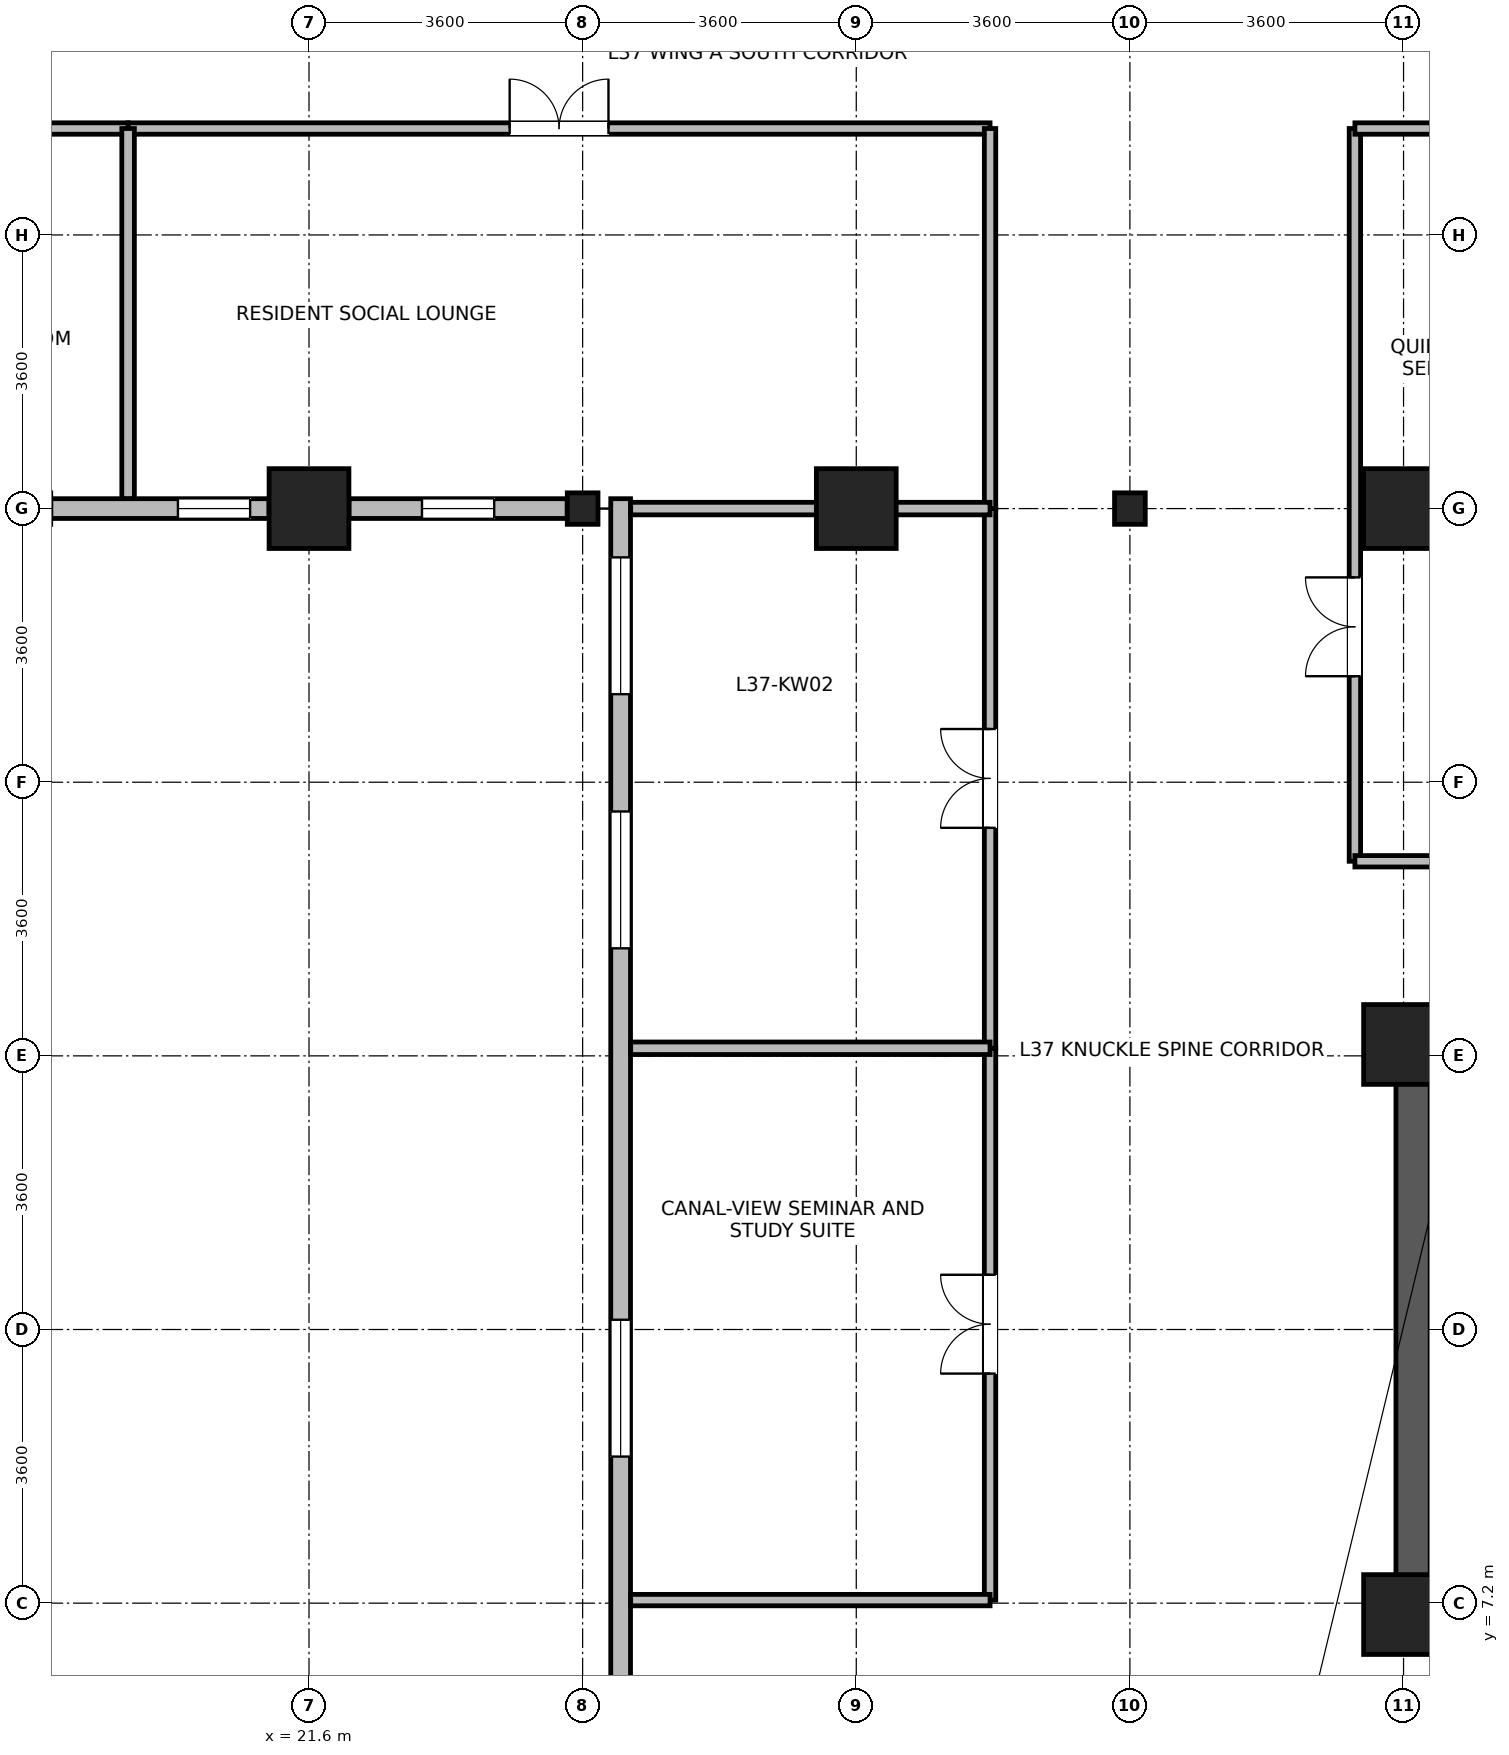
"""IFC4 building model, lengths in metres.
Left out: names, types, materials, properties, quantities, classifications, styles, units other than length and angle.
Written with IfcOpenShell. Run it as: python <this file> out.ifc"""

import sys

from ifc_helpers import new_model, si_unit, direction, frame, frame_2d, origin, origin_2d, place, context, subcontext, project, spatial, rectangle, i_section, extrude, source, transform, mapped, element, fill, save


model = new_model("IFC4")
c1 = context("Model", 3, precision=1e-05, world=origin(), true_north=direction((0.0, 1.0)))
c2 = subcontext(c1, "Body", "Model", "MODEL_VIEW")
j1 = project(units=[si_unit("LENGTHUNIT", "METRE"), si_unit("PLANEANGLEUNIT", "RADIAN")], contexts=[c1])
p1 = place(None, origin())
s1 = spatial("IfcSite", under=j1, at=p1, CompositionType="ELEMENT")
p2 = place(p1, origin())
s2 = spatial("IfcBuilding", under=s1, at=p2, CompositionType="ELEMENT")
p3 = place(p2, frame((0.0, 0.0, 147.6)))
s3 = spatial("IfcBuildingStorey", under=s2, at=p3, CompositionType="ELEMENT", Elevation=147.6)
p4 = place(p3, frame((36.125, 6.85, 0.0), z_axis=(0.0, 0.0, 1.0), x_axis=(0.0, 1.0, 0.0)))
e1 = element("IfcWall", 1, at=p4, inside=s3, PredefinedType="SHEAR", context=c2, shape_type="SweptSolid", body=[
    extrude(rectangle(XDim=7.9, YDim=0.45, at=frame_2d((3.95, 0.0))), origin(), (0.0, 0.0, 1.0), 3.46),
])
m1 = source(origin(), c2, "Body", "SweptSolid", [
    extrude(rectangle(XDim=1.05, YDim=1.05, at=origin_2d()), origin(), (0.0, 0.0, 1.0), 3.7),
])
for number, where, z_axis, x_axis in (
    (2, (21.6, 21.6, 0.0), (0.0, 0.0, 1.0), (1.0, 0.0, 0.0)),
    (3, (28.8, 21.6, 0.0), (0.0, 0.0, 1.0), (1.0, 0.0, 0.0)),
    (4, (36.0, 21.6, 0.0), (0.0, 0.0, 1.0), (1.0, 0.0, 0.0)),
    (5, (36.0, 7.05, 0.0), (0.0, 0.0, 1.0), (1.0, 0.0, 0.0)),
    (6, (36.0, 14.55, 0.0), (0.0, 0.0, 1.0), (1.0, 0.0, 0.0)),
):
    element("IfcColumn", number, at=place(p3, frame(where, z_axis=z_axis, x_axis=x_axis)), inside=s3, PredefinedType="COLUMN", context=c2, shape_type="MappedRepresentation", body=[
        mapped(m1, transform((0.0, 0.0, 0.0), x_axis=(1.0, 0.0, 0.0), y_axis=(0.0, 1.0, 0.0), z_axis=(0.0, 0.0, 1.0), scale=1.0)),
    ])
m2 = source(origin(), c2, "Body", "SweptSolid", [
    extrude(i_section(OverallWidth=0.404, OverallDepth=0.414, WebThickness=0.021, FlangeThickness=0.028, FilletRadius=0.015, at=origin_2d()), origin(), (0.0, 0.0, 1.0), 3.7),
])
for number, where, z_axis, x_axis in (
    (7, (25.2, 21.6, 0.0), (0.0, 0.0, 1.0), (1.0, 0.0, 0.0)),
    (8, (32.4, 21.6, 0.0), (0.0, 0.0, 1.0), (1.0, 0.0, 0.0)),
):
    element("IfcColumn", number, at=place(p3, frame(where, z_axis=z_axis, x_axis=x_axis)), inside=s3, PredefinedType="COLUMN", context=c2, shape_type="MappedRepresentation", body=[
        mapped(m2, transform((0.0, 0.0, 0.0), x_axis=(1.0, 0.0, 0.0), y_axis=(0.0, 1.0, 0.0), z_axis=(0.0, 0.0, 1.0), scale=1.0)),
    ])
p5 = place(p3, frame((21.074, 21.6, 0.0), z_axis=(0.0, 0.0, 1.0), x_axis=(-1.0, 0.0, 0.0)))
e9 = element("IfcWall", 9, at=p5, inside=s3, PredefinedType="STANDARD", context=c2, shape_type="SweptSolid", body=[
    extrude(rectangle(XDim=2.871, YDim=0.26, at=frame_2d((1.436, 0.0))), origin(), (0.0, 0.0, 1.0), 2.99),
])
p6 = place(p5, frame((0.249, 0.0, 0.85)))
e10 = element("IfcOpeningElement", 10, at=p6, cuts=e9, PredefinedType="OPENING", context=c2, shape_type="SweptSolid", body=[
    extrude(rectangle(XDim=0.95, YDim=1.75, at=frame_2d((0.475, 0.875))), frame((0.0, 0.14, 0.0), z_axis=(0.0, -1.0, 0.0), x_axis=(1.0, 0.0, 0.0)), (0.0, 0.0, 1.0), 0.28),
])
p7 = place(p3, frame((24.997, 21.6, 0.0), z_axis=(0.0, 0.0, 1.0), x_axis=(-1.0, 0.0, 0.0)))
e11 = element("IfcWall", 11, at=p7, inside=s3, PredefinedType="STANDARD", context=c2, shape_type="SweptSolid", body=[
    extrude(rectangle(XDim=2.871, YDim=0.26, at=frame_2d((1.436, 0.0))), origin(), (0.0, 0.0, 1.0), 2.99),
])
p8 = place(p7, frame((0.96, 0.0, 0.85)))
e12 = element("IfcOpeningElement", 12, at=p8, cuts=e11, PredefinedType="OPENING", context=c2, shape_type="SweptSolid", body=[
    extrude(rectangle(XDim=0.95, YDim=1.75, at=frame_2d((0.475, 0.875))), frame((0.0, 0.14, 0.0), z_axis=(0.0, -1.0, 0.0), x_axis=(1.0, 0.0, 0.0)), (0.0, 0.0, 1.0), 0.28),
])
p9 = place(p3, frame((25.7, 1.67, 0.0), z_axis=(0.0, 0.0, 1.0), x_axis=(0.0, 1.0, 0.0)))
e13 = element("IfcWall", 13, at=p9, inside=s3, PredefinedType="STANDARD", context=c2, shape_type="SweptSolid", body=[
    extrude(rectangle(XDim=20.06, YDim=0.26, at=frame_2d((10.03, 0.0))), origin(), (0.0, 0.0, 1.0), 3.44),
])
p10 = place(p9, frame((0.772, 0.0, 0.85)))
e14 = element("IfcOpeningElement", 14, at=p10, cuts=e13, PredefinedType="OPENING", context=c2, shape_type="SweptSolid", body=[
    extrude(rectangle(XDim=1.8, YDim=1.85, at=frame_2d((0.9, 0.925))), frame((0.0, 0.14, 0.0), z_axis=(0.0, -1.0, 0.0), x_axis=(1.0, 0.0, 0.0)), (0.0, 0.0, 1.0), 0.28),
])
p11 = place(p9, frame((7.458, 0.0, 0.85)))
e15 = element("IfcOpeningElement", 15, at=p11, cuts=e13, PredefinedType="OPENING", context=c2, shape_type="SweptSolid", body=[
    extrude(rectangle(XDim=1.8, YDim=1.85, at=frame_2d((0.9, 0.925))), frame((0.0, 0.14, 0.0), z_axis=(0.0, -1.0, 0.0), x_axis=(1.0, 0.0, 0.0)), (0.0, 0.0, 1.0), 0.28),
])
p12 = place(p9, frame((14.145, 0.0, 0.85)))
e16 = element("IfcOpeningElement", 16, at=p12, cuts=e13, PredefinedType="OPENING", context=c2, shape_type="SweptSolid", body=[
    extrude(rectangle(XDim=1.8, YDim=1.85, at=frame_2d((0.9, 0.925))), frame((0.0, 0.14, 0.0), z_axis=(0.0, -1.0, 0.0), x_axis=(1.0, 0.0, 0.0)), (0.0, 0.0, 1.0), 0.28),
])
p13 = place(p9, frame((17.488, 0.0, 0.85)))
e17 = element("IfcOpeningElement", 17, at=p13, cuts=e13, PredefinedType="OPENING", context=c2, shape_type="SweptSolid", body=[
    extrude(rectangle(XDim=1.8, YDim=1.85, at=frame_2d((0.9, 0.925))), frame((0.0, 0.14, 0.0), z_axis=(0.0, -1.0, 0.0), x_axis=(1.0, 0.0, 0.0)), (0.0, 0.0, 1.0), 0.28),
])
p14 = place(p3, frame((19.22, 26.6, 0.0), z_axis=(0.0, 0.0, 1.0), x_axis=(1.0, 0.0, 0.0)))
e18 = element("IfcWall", 18, at=p14, inside=s3, PredefinedType="PARTITIONING", context=c2, shape_type="SweptSolid", body=[
    extrude(rectangle(XDim=11.34, YDim=0.15, at=frame_2d((5.67, 0.0))), origin(), (0.0, 0.0, 1.0), 3.44),
])
p15 = place(p14, frame((5.02, 0.0, 0.0)))
e19 = element("IfcOpeningElement", 19, at=p15, cuts=e18, PredefinedType="OPENING", context=c2, shape_type="SweptSolid", body=[
    extrude(rectangle(XDim=1.3, YDim=2.12, at=frame_2d((0.65, 1.06))), frame((0.0, 0.085, 0.0), z_axis=(0.0, -1.0, 0.0), x_axis=(1.0, 0.0, 0.0)), (0.0, 0.0, 1.0), 0.17),
])
p16 = place(p3, frame((35.36, 16.96, 0.0), z_axis=(0.0, 0.0, 1.0), x_axis=(0.0, 1.0, 0.0)))
e20 = element("IfcWall", 20, at=p16, inside=s3, PredefinedType="PARTITIONING", context=c2, shape_type="SweptSolid", body=[
    extrude(rectangle(XDim=9.64, YDim=0.15, at=frame_2d((4.82, 0.0))), origin(), (0.0, 0.0, 1.0), 3.44),
])
p17 = place(p16, frame((2.435, 0.0, 0.0)))
e21 = element("IfcOpeningElement", 21, at=p17, cuts=e20, PredefinedType="OPENING", context=c2, shape_type="SweptSolid", body=[
    extrude(rectangle(XDim=1.3, YDim=2.12, at=frame_2d((0.65, 1.06))), frame((0.0, 0.085, 0.0), z_axis=(0.0, -1.0, 0.0), x_axis=(1.0, 0.0, 0.0)), (0.0, 0.0, 1.0), 0.17),
])
p18 = place(p3, frame((30.56, 7.24, 0.0), z_axis=(0.0, 0.0, 1.0), x_axis=(0.0, 1.0, 0.0)))
e22 = element("IfcWall", 22, at=p18, inside=s3, PredefinedType="PARTITIONING", context=c2, shape_type="SweptSolid", body=[
    extrude(rectangle(XDim=7.26, YDim=0.15, at=frame_2d((3.63, 0.0))), origin(), (0.0, 0.0, 1.0), 3.44),
])
p19 = place(p18, frame((2.98, 0.0, 0.0)))
e23 = element("IfcOpeningElement", 23, at=p19, cuts=e22, PredefinedType="OPENING", context=c2, shape_type="SweptSolid", body=[
    extrude(rectangle(XDim=1.3, YDim=2.12, at=frame_2d((0.65, 1.06))), frame((0.0, 0.085, 0.0), z_axis=(0.0, -1.0, 0.0), x_axis=(1.0, 0.0, 0.0)), (0.0, 0.0, 1.0), 0.17),
])
p20 = place(p3, frame((30.56, 14.5, 0.0), z_axis=(0.0, 0.0, 1.0), x_axis=(0.0, 1.0, 0.0)))
e24 = element("IfcWall", 24, at=p20, inside=s3, PredefinedType="PARTITIONING", context=c2, shape_type="SweptSolid", body=[
    extrude(rectangle(XDim=7.1, YDim=0.15, at=frame_2d((3.55, 0.0))), origin(), (0.0, 0.0, 1.0), 3.44),
])
p21 = place(p20, frame((2.9, 0.0, 0.0)))
e25 = element("IfcOpeningElement", 25, at=p21, cuts=e24, PredefinedType="OPENING", context=c2, shape_type="SweptSolid", body=[
    extrude(rectangle(XDim=1.3, YDim=2.12, at=frame_2d((0.65, 1.06))), frame((0.0, 0.085, 0.0), z_axis=(0.0, -1.0, 0.0), x_axis=(1.0, 0.0, 0.0)), (0.0, 0.0, 1.0), 0.17),
])
p22 = place(p3, frame((13.26, 26.6, 0.0), z_axis=(0.0, 0.0, 1.0), x_axis=(1.0, 0.0, 0.0)))
e26 = element("IfcWall", 26, at=p22, inside=s3, PredefinedType="PARTITIONING", context=c2, shape_type="SweptSolid", body=[
    extrude(rectangle(XDim=5.96, YDim=0.15, at=frame_2d((2.98, 0.0))), origin(), (0.0, 0.0, 1.0), 3.44),
])
p23 = place(p22, frame((2.33, 0.0, 0.0)))
e27 = element("IfcOpeningElement", 27, at=p23, cuts=e26, PredefinedType="OPENING", context=c2, shape_type="SweptSolid", body=[
    extrude(rectangle(XDim=1.3, YDim=2.12, at=frame_2d((0.65, 1.06))), frame((0.0, 0.085, 0.0), z_axis=(0.0, -1.0, 0.0), x_axis=(1.0, 0.0, 0.0)), (0.0, 0.0, 1.0), 0.17),
])
p24 = place(p3, frame((30.56, 21.6, 0.0), z_axis=(0.0, 0.0, 1.0), x_axis=(0.0, 1.0, 0.0)))
e28 = element("IfcWall", 28, at=p24, inside=s3, PredefinedType="PARTITIONING", context=c2, shape_type="SweptSolid", body=[
    extrude(rectangle(XDim=5.0, YDim=0.15, at=frame_2d((2.5, 0.0))), origin(), (0.0, 0.0, 1.0), 3.44),
])
p25 = place(p3, frame((25.832, 7.24, 0.0), z_axis=(0.0, 0.0, 1.0), x_axis=(1.0, 0.0, 0.0)))
e29 = element("IfcWall", 29, at=p25, inside=s3, PredefinedType="PARTITIONING", context=c2, shape_type="SweptSolid", body=[
    extrude(rectangle(XDim=4.728, YDim=0.15, at=frame_2d((2.364, 0.0))), origin(), (0.0, 0.0, 1.0), 3.44),
])
for number, where, z_axis, x_axis in (
    (30, (35.36, 16.96, 0.0), (0.0, 0.0, 1.0), (1.0, 0.0, 0.0)),
    (31, (35.36, 26.6, 0.0), (0.0, 0.0, 1.0), (1.0, 0.0, 0.0)),
):
    element("IfcWall", number, at=place(p3, frame(where, z_axis=z_axis, x_axis=x_axis)), inside=s3, PredefinedType="PARTITIONING", context=c2, shape_type="SweptSolid", body=[
        extrude(rectangle(XDim=3.28, YDim=0.15, at=frame_2d((1.64, 0.0))), origin(), (0.0, 0.0, 1.0), 3.44),
    ])
p26 = place(p3, frame((19.22, 21.732, 0.0), z_axis=(0.0, 0.0, 1.0), x_axis=(0.0, 1.0, 0.0)))
e32 = element("IfcWall", 32, at=p26, inside=s3, PredefinedType="PARTITIONING", context=c2, shape_type="SweptSolid", body=[
    extrude(rectangle(XDim=4.868, YDim=0.165, at=frame_2d((2.434, 0.0))), origin(), (0.0, 0.0, 1.0), 3.44),
])
p27 = place(p3, frame((25.832, 14.5, 0.0), z_axis=(0.0, 0.0, 1.0), x_axis=(1.0, 0.0, 0.0)))
e33 = element("IfcWall", 33, at=p27, inside=s3, PredefinedType="PARTITIONING", context=c2, shape_type="SweptSolid", body=[
    extrude(rectangle(XDim=4.728, YDim=0.165, at=frame_2d((2.364, 0.0))), origin(), (0.0, 0.0, 1.0), 3.44),
])
p28 = place(p3, frame((25.832, 21.6, 0.0), z_axis=(0.0, 0.0, 1.0), x_axis=(1.0, 0.0, 0.0)))
e34 = element("IfcWall", 34, at=p28, inside=s3, PredefinedType="PARTITIONING", context=c2, shape_type="SweptSolid", body=[
    extrude(rectangle(XDim=4.728, YDim=0.165, at=frame_2d((2.364, 0.0))), origin(), (0.0, 0.0, 1.0), 2.99),
])
p29 = place(p6, origin())
e35 = element("IfcWindow", 35, at=p29, inside=s3, PartitioningType="SINGLE_PANEL", PredefinedType="WINDOW", context=c2, shape_type="SweptSolid", body=[
    extrude(rectangle(XDim=0.95, YDim=1.75, at=frame_2d((0.475, 0.875))), frame((0.0, 0.03, 0.0), z_axis=(0.0, -1.0, 0.0), x_axis=(1.0, 0.0, 0.0)), (0.0, 0.0, 1.0), 0.06),
])
fill(e10, e35)
p30 = place(p8, origin())
e36 = element("IfcWindow", 36, at=p30, inside=s3, PartitioningType="SINGLE_PANEL", PredefinedType="WINDOW", context=c2, shape_type="SweptSolid", body=[
    extrude(rectangle(XDim=0.95, YDim=1.75, at=frame_2d((0.475, 0.875))), frame((0.0, 0.03, 0.0), z_axis=(0.0, -1.0, 0.0), x_axis=(1.0, 0.0, 0.0)), (0.0, 0.0, 1.0), 0.06),
])
fill(e12, e36)
p31 = place(p11, origin())
e37 = element("IfcWindow", 37, at=p31, inside=s3, PartitioningType="SINGLE_PANEL", PredefinedType="WINDOW", context=c2, shape_type="SweptSolid", body=[
    extrude(rectangle(XDim=1.8, YDim=1.85, at=frame_2d((0.9, 0.925))), frame((0.0, 0.03, 0.0), z_axis=(0.0, -1.0, 0.0), x_axis=(1.0, 0.0, 0.0)), (0.0, 0.0, 1.0), 0.06),
])
fill(e15, e37)
p32 = place(p12, origin())
e38 = element("IfcWindow", 38, at=p32, inside=s3, PartitioningType="SINGLE_PANEL", PredefinedType="WINDOW", context=c2, shape_type="SweptSolid", body=[
    extrude(rectangle(XDim=1.8, YDim=1.85, at=frame_2d((0.9, 0.925))), frame((0.0, 0.03, 0.0), z_axis=(0.0, -1.0, 0.0), x_axis=(1.0, 0.0, 0.0)), (0.0, 0.0, 1.0), 0.06),
])
fill(e16, e38)
p33 = place(p13, origin())
e39 = element("IfcWindow", 39, at=p33, inside=s3, PartitioningType="SINGLE_PANEL", PredefinedType="WINDOW", context=c2, shape_type="SweptSolid", body=[
    extrude(rectangle(XDim=1.8, YDim=1.85, at=frame_2d((0.9, 0.925))), frame((0.0, 0.03, 0.0), z_axis=(0.0, -1.0, 0.0), x_axis=(1.0, 0.0, 0.0)), (0.0, 0.0, 1.0), 0.06),
])
fill(e17, e39)
p34 = place(p15, origin())
e40 = element("IfcDoor", 40, at=p34, inside=s3, OperationType="DOUBLE_DOOR_SINGLE_SWING", PredefinedType="DOOR", context=c2, shape_type="SweptSolid", body=[
    extrude(rectangle(XDim=1.3, YDim=2.12, at=frame_2d((0.65, 1.06))), frame((0.0, 0.025, 0.0), z_axis=(0.0, -1.0, 0.0), x_axis=(1.0, 0.0, 0.0)), (0.0, 0.0, 1.0), 0.05),
])
fill(e19, e40)
p35 = place(p17, origin())
e41 = element("IfcDoor", 41, at=p35, inside=s3, OperationType="DOUBLE_DOOR_SINGLE_SWING", PredefinedType="DOOR", context=c2, shape_type="SweptSolid", body=[
    extrude(rectangle(XDim=1.3, YDim=2.12, at=frame_2d((0.65, 1.06))), frame((0.0, 0.025, 0.0), z_axis=(0.0, -1.0, 0.0), x_axis=(1.0, 0.0, 0.0)), (0.0, 0.0, 1.0), 0.05),
])
fill(e21, e41)
p36 = place(p19, origin())
e42 = element("IfcDoor", 42, at=p36, inside=s3, OperationType="DOUBLE_DOOR_SINGLE_SWING", PredefinedType="DOOR", context=c2, shape_type="SweptSolid", body=[
    extrude(rectangle(XDim=1.3, YDim=2.12, at=frame_2d((0.65, 1.06))), frame((0.0, 0.025, 0.0), z_axis=(0.0, -1.0, 0.0), x_axis=(1.0, 0.0, 0.0)), (0.0, 0.0, 1.0), 0.05),
])
fill(e23, e42)
p37 = place(p21, origin())
e43 = element("IfcDoor", 43, at=p37, inside=s3, OperationType="DOUBLE_DOOR_SINGLE_SWING", PredefinedType="DOOR", context=c2, shape_type="SweptSolid", body=[
    extrude(rectangle(XDim=1.3, YDim=2.12, at=frame_2d((0.65, 1.06))), frame((0.0, 0.025, 0.0), z_axis=(0.0, -1.0, 0.0), x_axis=(1.0, 0.0, 0.0)), (0.0, 0.0, 1.0), 0.05),
])
fill(e25, e43)
save(model, sys.argv[1])
